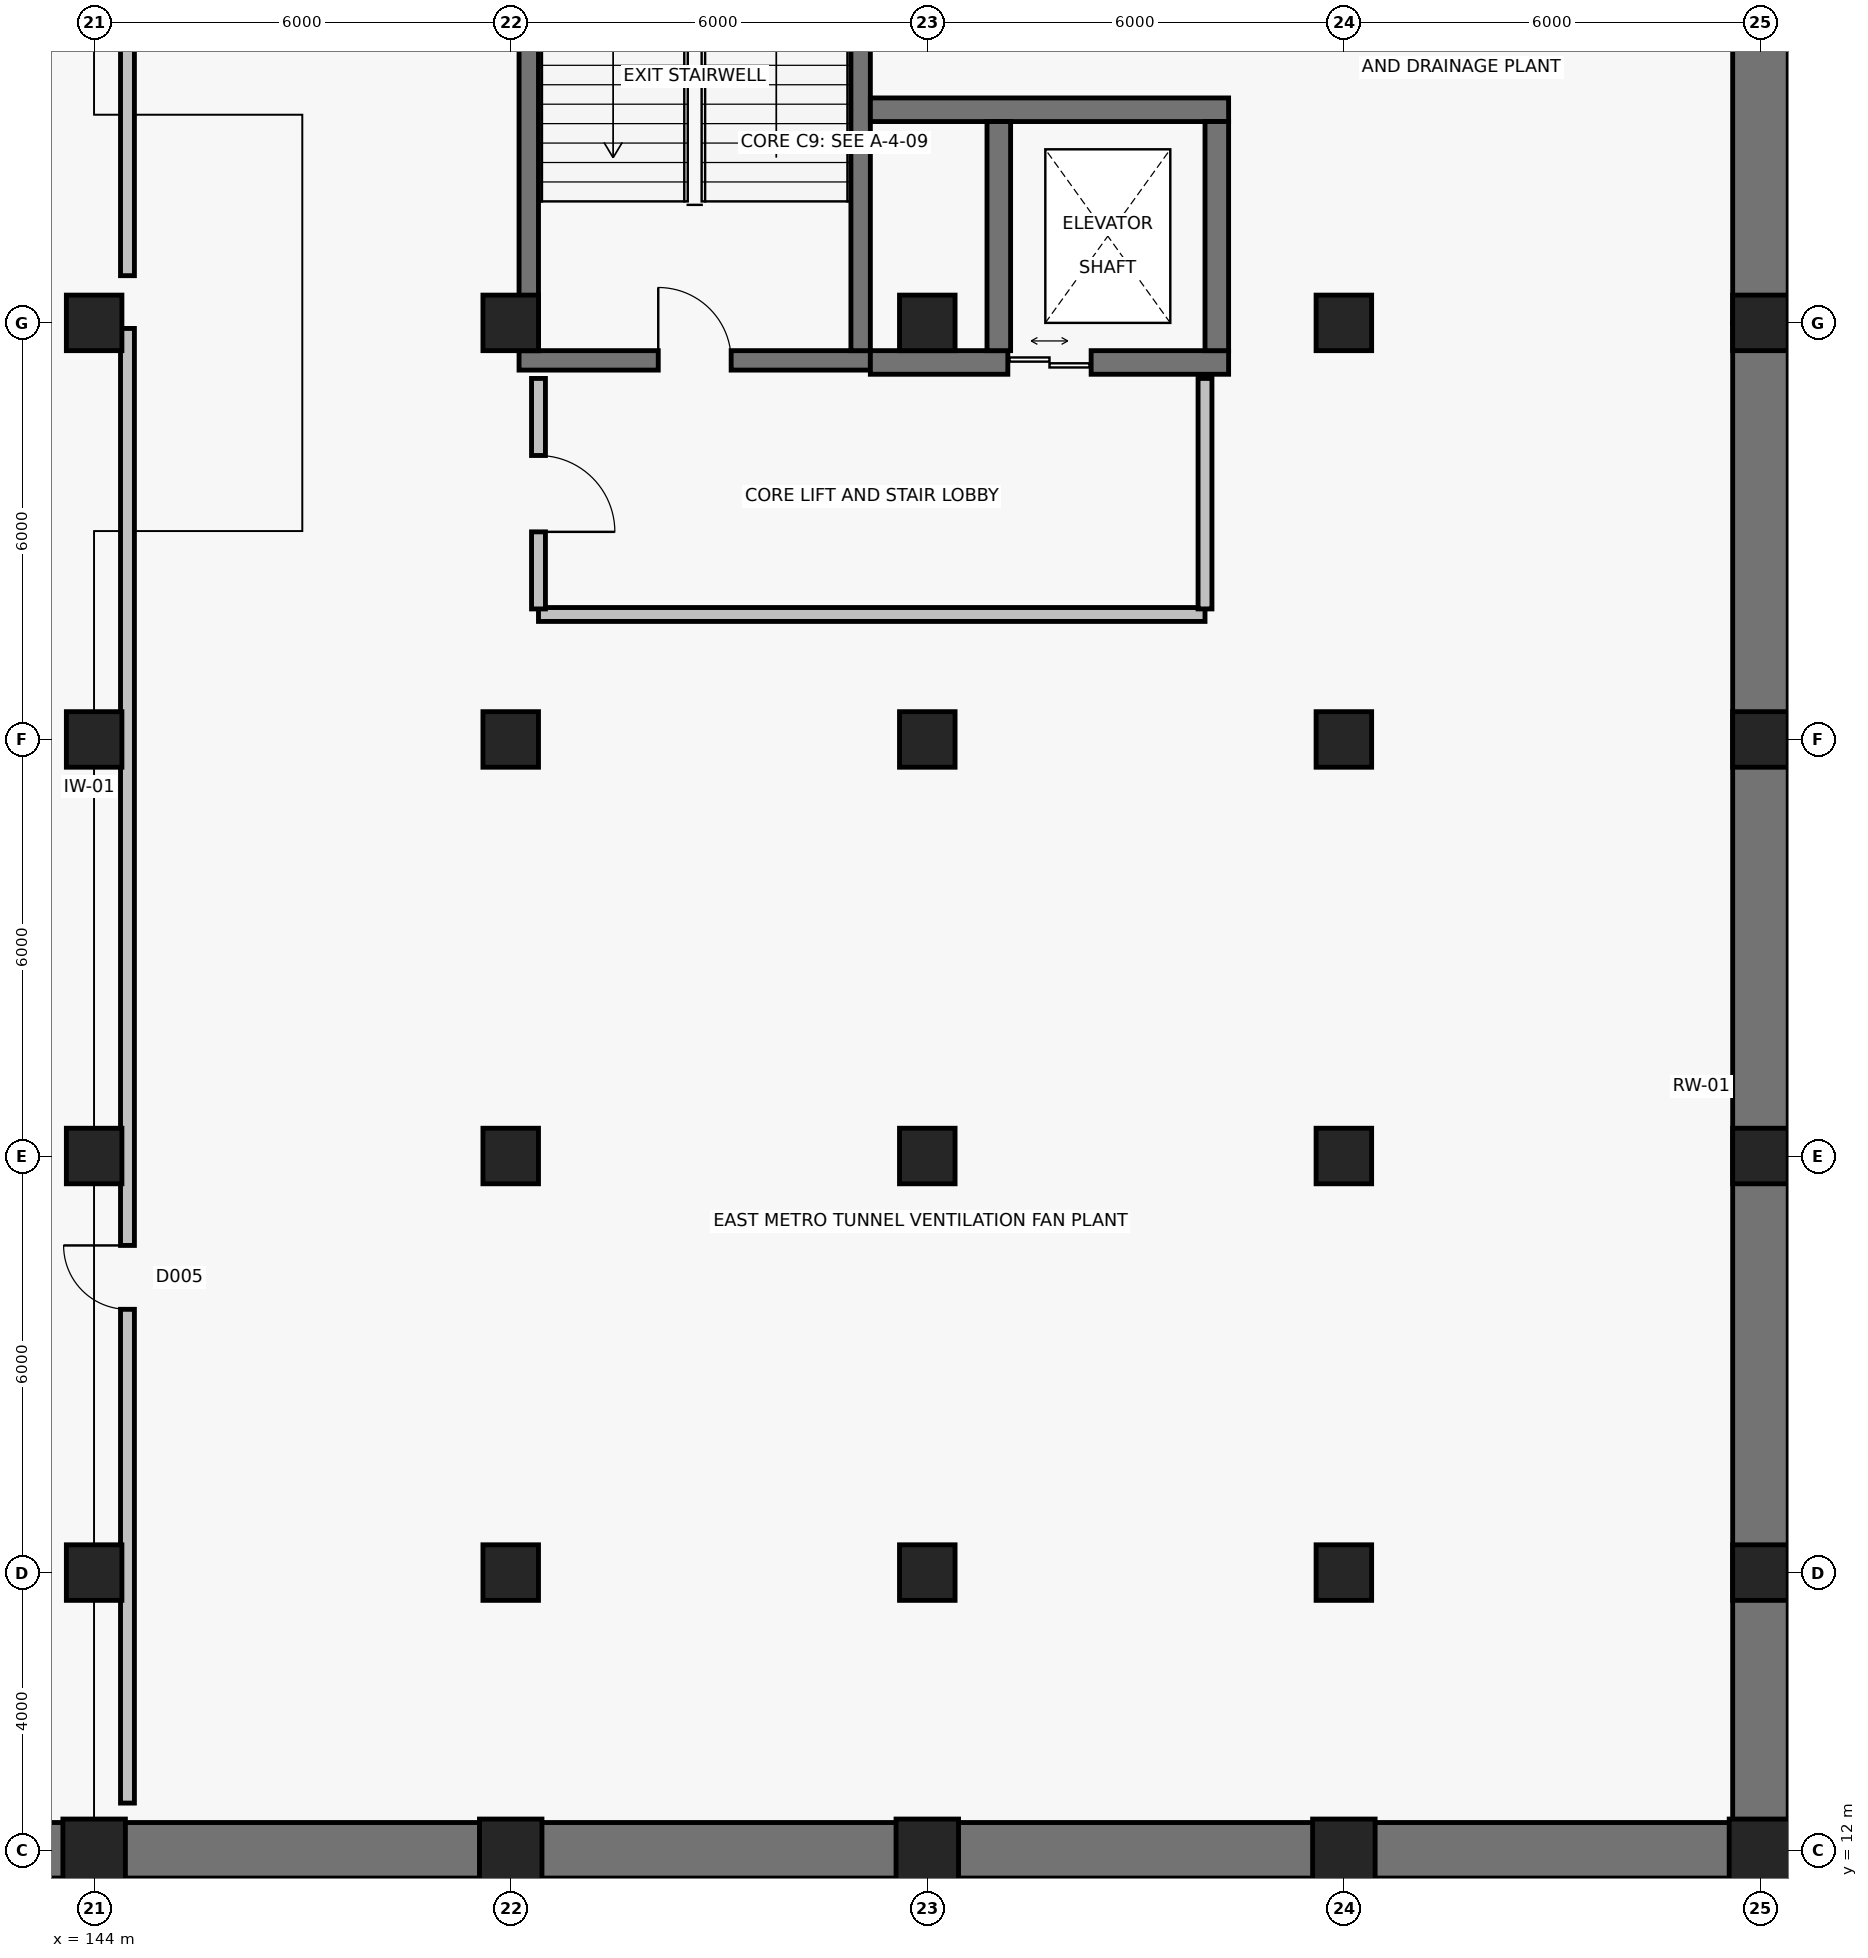
"""IFC4 building model, lengths in metres.
Left out: names, types, materials, properties, quantities, classifications, styles, units other than length and angle.
Written with IfcOpenShell. Run it as: python <this file> out.ifc"""

import sys

from ifc_helpers import new_model, si_unit, direction, frame, frame_2d, origin, origin_2d, place, context, subcontext, project, spatial, rectangle, extrude, element, fill, save


model = new_model("IFC4")
c1 = context("Model", 3, precision=1e-05, world=origin(), true_north=direction((0.0, 1.0)))
c2 = subcontext(c1, "Body", "Model", "MODEL_VIEW")
j1 = project(units=[si_unit("LENGTHUNIT", "METRE"), si_unit("PLANEANGLEUNIT", "RADIAN")], contexts=[c1])
p1 = place(None, origin())
s1 = spatial("IfcSite", under=j1, at=p1, CompositionType="ELEMENT")
p2 = place(p1, origin())
s2 = spatial("IfcBuilding", under=s1, at=p2, CompositionType="ELEMENT")
p3 = place(p2, frame((0.0, 0.0, -10.4)))
s3 = spatial("IfcBuildingStorey", under=s2, at=p3, CompositionType="ELEMENT", Elevation=-10.4)
p4 = place(p3, frame((144.0, 12.0, 0.0), z_axis=(0.0, 0.0, 1.0), x_axis=(1.0, 0.0, 0.0)))
e1 = element("IfcColumn", 1, at=p4, inside=s3, PredefinedType="COLUMN", context=c2, shape_type="SweptSolid", body=[
    extrude(rectangle(XDim=0.9, YDim=0.9, at=origin_2d()), origin(), (0.0, 0.0, 1.0), 5.6),
])
for number, where, z_axis, x_axis in (
    (2, (144.0, 16.0, 0.0), (0.0, 0.0, 1.0), (1.0, 0.0, 0.0)),
    (3, (144.0, 22.0, 0.0), (0.0, 0.0, 1.0), (1.0, 0.0, 0.0)),
    (4, (144.0, 28.0, 0.0), (0.0, 0.0, 1.0), (1.0, 0.0, 0.0)),
    (5, (144.0, 34.0, 0.0), (0.0, 0.0, 1.0), (1.0, 0.0, 0.0)),
):
    element("IfcColumn", number, at=place(p3, frame(where, z_axis=z_axis, x_axis=x_axis)), inside=s3, PredefinedType="COLUMN", context=c2, shape_type="SweptSolid", body=[
        extrude(rectangle(XDim=0.8, YDim=0.8, at=origin_2d()), origin(), (0.0, 0.0, 1.0), 5.6),
    ])
p5 = place(p3, frame((150.0, 12.0, 0.0), z_axis=(0.0, 0.0, 1.0), x_axis=(1.0, 0.0, 0.0)))
e6 = element("IfcColumn", 6, at=p5, inside=s3, PredefinedType="COLUMN", context=c2, shape_type="SweptSolid", body=[
    extrude(rectangle(XDim=0.9, YDim=0.9, at=origin_2d()), origin(), (0.0, 0.0, 1.0), 5.6),
])
for number, where, z_axis, x_axis in (
    (7, (150.0, 16.0, 0.0), (0.0, 0.0, 1.0), (1.0, 0.0, 0.0)),
    (8, (150.0, 22.0, 0.0), (0.0, 0.0, 1.0), (1.0, 0.0, 0.0)),
    (9, (150.0, 28.0, 0.0), (0.0, 0.0, 1.0), (1.0, 0.0, 0.0)),
    (10, (150.0, 34.0, 0.0), (0.0, 0.0, 1.0), (1.0, 0.0, 0.0)),
):
    element("IfcColumn", number, at=place(p3, frame(where, z_axis=z_axis, x_axis=x_axis)), inside=s3, PredefinedType="COLUMN", context=c2, shape_type="SweptSolid", body=[
        extrude(rectangle(XDim=0.8, YDim=0.8, at=origin_2d()), origin(), (0.0, 0.0, 1.0), 5.6),
    ])
p6 = place(p3, frame((156.0, 12.0, 0.0), z_axis=(0.0, 0.0, 1.0), x_axis=(1.0, 0.0, 0.0)))
e11 = element("IfcColumn", 11, at=p6, inside=s3, PredefinedType="COLUMN", context=c2, shape_type="SweptSolid", body=[
    extrude(rectangle(XDim=0.9, YDim=0.9, at=origin_2d()), origin(), (0.0, 0.0, 1.0), 5.6),
])
for number, where, z_axis, x_axis in (
    (12, (156.0, 16.0, 0.0), (0.0, 0.0, 1.0), (1.0, 0.0, 0.0)),
    (13, (156.0, 22.0, 0.0), (0.0, 0.0, 1.0), (1.0, 0.0, 0.0)),
    (14, (156.0, 28.0, 0.0), (0.0, 0.0, 1.0), (1.0, 0.0, 0.0)),
    (15, (156.0, 34.0, 0.0), (0.0, 0.0, 1.0), (1.0, 0.0, 0.0)),
):
    element("IfcColumn", number, at=place(p3, frame(where, z_axis=z_axis, x_axis=x_axis)), inside=s3, PredefinedType="COLUMN", context=c2, shape_type="SweptSolid", body=[
        extrude(rectangle(XDim=0.8, YDim=0.8, at=origin_2d()), origin(), (0.0, 0.0, 1.0), 5.6),
    ])
p7 = place(p3, frame((162.0, 12.0, 0.0), z_axis=(0.0, 0.0, 1.0), x_axis=(1.0, 0.0, 0.0)))
e16 = element("IfcColumn", 16, at=p7, inside=s3, PredefinedType="COLUMN", context=c2, shape_type="SweptSolid", body=[
    extrude(rectangle(XDim=0.9, YDim=0.9, at=origin_2d()), origin(), (0.0, 0.0, 1.0), 5.6),
])
for number, where, z_axis, x_axis in (
    (17, (162.0, 16.0, 0.0), (0.0, 0.0, 1.0), (1.0, 0.0, 0.0)),
    (18, (162.0, 22.0, 0.0), (0.0, 0.0, 1.0), (1.0, 0.0, 0.0)),
    (19, (162.0, 28.0, 0.0), (0.0, 0.0, 1.0), (1.0, 0.0, 0.0)),
    (20, (162.0, 34.0, 0.0), (0.0, 0.0, 1.0), (1.0, 0.0, 0.0)),
):
    element("IfcColumn", number, at=place(p3, frame(where, z_axis=z_axis, x_axis=x_axis)), inside=s3, PredefinedType="COLUMN", context=c2, shape_type="SweptSolid", body=[
        extrude(rectangle(XDim=0.8, YDim=0.8, at=origin_2d()), origin(), (0.0, 0.0, 1.0), 5.6),
    ])
p8 = place(p3, frame((168.0, 12.0, 0.0), z_axis=(0.0, 0.0, 1.0), x_axis=(1.0, 0.0, 0.0)))
e21 = element("IfcColumn", 21, at=p8, inside=s3, PredefinedType="COLUMN", context=c2, shape_type="SweptSolid", body=[
    extrude(rectangle(XDim=0.9, YDim=0.9, at=origin_2d()), origin(), (0.0, 0.0, 1.0), 5.6),
])
for number, where, z_axis, x_axis in (
    (22, (168.0, 16.0, 0.0), (0.0, 0.0, 1.0), (1.0, 0.0, 0.0)),
    (23, (168.0, 22.0, 0.0), (0.0, 0.0, 1.0), (1.0, 0.0, 0.0)),
    (24, (168.0, 28.0, 0.0), (0.0, 0.0, 1.0), (1.0, 0.0, 0.0)),
    (25, (168.0, 34.0, 0.0), (0.0, 0.0, 1.0), (1.0, 0.0, 0.0)),
):
    element("IfcColumn", number, at=place(p3, frame(where, z_axis=z_axis, x_axis=x_axis)), inside=s3, PredefinedType="COLUMN", context=c2, shape_type="SweptSolid", body=[
        extrude(rectangle(XDim=0.8, YDim=0.8, at=origin_2d()), origin(), (0.0, 0.0, 1.0), 5.6),
    ])
p9 = place(p3, frame((138.0, 12.0, 0.0), z_axis=(0.0, 0.0, 1.0), x_axis=(1.0, 0.0, 0.0)))
e26 = element("IfcWall", 26, at=p9, inside=s3, PredefinedType="USERDEFINED", context=c2, shape_type="SweptSolid", body=[
    extrude(rectangle(XDim=30.0, YDim=0.8, at=frame_2d((15.0, 0.0))), origin(), (0.0, 0.0, 1.0), 5.15),
])
for number, where, z_axis, x_axis in (
    (27, (168.0, 12.0, 0.0), (0.0, 0.0, 1.0), (0.0, 1.0, 0.0)),
    (28, (168.0, 34.0, 0.0), (0.0, 0.0, 1.0), (0.0, 1.0, 0.0)),
):
    element("IfcWall", number, at=place(p3, frame(where, z_axis=z_axis, x_axis=x_axis)), inside=s3, PredefinedType="USERDEFINED", context=c2, shape_type="SweptSolid", body=[
        extrude(rectangle(XDim=22.0, YDim=0.8, at=frame_2d((11.0, 0.0))), origin(), (0.0, 0.0, 1.0), 5.15),
    ])
p10 = place(p3, frame((150.12, 33.46, 0.0), z_axis=(0.0, 0.0, 1.0), x_axis=(1.0, 0.0, 0.0)))
e29 = element("IfcWall", 29, at=p10, inside=s3, PredefinedType="SHEAR", context=c2, shape_type="SweptSolid", body=[
    extrude(rectangle(XDim=5.06, YDim=0.28, at=frame_2d((2.53, 0.0))), origin(), (0.0, 0.0, 1.0), 5.15),
])
p11 = place(p10, frame((2.005, 0.0, 0.0)))
e30 = element("IfcOpeningElement", 30, at=p11, cuts=e29, PredefinedType="OPENING", context=c2, shape_type="SweptSolid", body=[
    extrude(rectangle(XDim=1.05, YDim=2.15, at=frame_2d((0.525, 1.075))), frame((0.0, 0.155, 0.0), z_axis=(0.0, -1.0, 0.0), x_axis=(1.0, 0.0, 0.0)), (0.0, 0.0, 1.0), 0.31),
])
for number, where, z_axis, x_axis in (
    (31, (150.26, 43.4, 0.0), (0.0, 0.0, 1.0), (0.0, -1.0, 0.0)),
    (32, (155.04, 33.6, 0.0), (0.0, 0.0, 1.0), (0.0, 1.0, 0.0)),
):
    element("IfcWall", number, at=place(p3, frame(where, z_axis=z_axis, x_axis=x_axis)), inside=s3, PredefinedType="SHEAR", context=c2, shape_type="SweptSolid", body=[
        extrude(rectangle(XDim=9.8, YDim=0.28, at=frame_2d((4.9, 0.0))), origin(), (0.0, 0.0, 1.0), 5.15),
    ])
p12 = place(p3, frame((155.18, 33.43, 0.0), z_axis=(0.0, 0.0, 1.0), x_axis=(1.0, 0.0, 0.0)))
e33 = element("IfcWall", 33, at=p12, inside=s3, PredefinedType="SHEAR", context=c2, shape_type="SweptSolid", body=[
    extrude(rectangle(XDim=5.16, YDim=0.34, at=frame_2d((2.58, 0.0))), origin(), (0.0, 0.0, 1.0), 5.15),
])
p13 = place(p12, frame((1.98, 0.0, 0.0)))
e34 = element("IfcOpeningElement", 34, at=p13, cuts=e33, PredefinedType="OPENING", context=c2, shape_type="SweptSolid", body=[
    extrude(rectangle(XDim=1.2, YDim=2.2, at=frame_2d((0.6, 1.1))), frame((0.0, 0.185, 0.0), z_axis=(0.0, -1.0, 0.0), x_axis=(1.0, 0.0, 0.0)), (0.0, 0.0, 1.0), 0.37),
])
p14 = place(p3, frame((160.34, 37.07, 0.0), z_axis=(0.0, 0.0, 1.0), x_axis=(-1.0, 0.0, 0.0)))
e35 = element("IfcWall", 35, at=p14, inside=s3, PredefinedType="SHEAR", context=c2, shape_type="SweptSolid", body=[
    extrude(rectangle(XDim=5.16, YDim=0.34, at=frame_2d((2.58, 0.0))), origin(), (0.0, 0.0, 1.0), 5.15),
])
for number, where, z_axis, x_axis in (
    (36, (157.03, 36.9, 0.0), (0.0, 0.0, 1.0), (0.0, -1.0, 0.0)),
    (37, (160.17, 33.6, 0.0), (0.0, 0.0, 1.0), (0.0, 1.0, 0.0)),
):
    element("IfcWall", number, at=place(p3, frame(where, z_axis=z_axis, x_axis=x_axis)), inside=s3, PredefinedType="SHEAR", context=c2, shape_type="SweptSolid", body=[
        extrude(rectangle(XDim=3.3, YDim=0.34, at=frame_2d((1.65, 0.0))), origin(), (0.0, 0.0, 1.0), 5.15),
    ])
p15 = place(p3, frame((150.4, 29.8, 0.0), z_axis=(0.0, 0.0, 1.0), x_axis=(1.0, 0.0, 0.0)))
e38 = element("IfcWall", 38, at=p15, inside=s3, PredefinedType="PARTITIONING", context=c2, shape_type="SweptSolid", body=[
    extrude(rectangle(XDim=9.6, YDim=0.2, at=frame_2d((4.8, 0.0))), origin(), (0.0, 0.0, 1.0), 4.68),
])
p16 = place(p3, frame((150.4, 33.2, 0.0), z_axis=(0.0, 0.0, 1.0), x_axis=(0.0, -1.0, 0.0)))
e39 = element("IfcWall", 39, at=p16, inside=s3, PredefinedType="PARTITIONING", context=c2, shape_type="SweptSolid", body=[
    extrude(rectangle(XDim=3.32, YDim=0.2, at=frame_2d((1.66, 0.0))), origin(), (0.0, 0.0, 1.0), 4.68),
])
p17 = place(p16, frame((1.11, 0.0, 0.0)))
e40 = element("IfcOpeningElement", 40, at=p17, cuts=e39, PredefinedType="OPENING", context=c2, shape_type="SweptSolid", body=[
    extrude(rectangle(XDim=1.1, YDim=2.15, at=frame_2d((0.55, 1.075))), frame((0.0, 0.115, 0.0), z_axis=(0.0, -1.0, 0.0), x_axis=(1.0, 0.0, 0.0)), (0.0, 0.0, 1.0), 0.23),
])
p18 = place(p3, frame((160.0, 29.88, 0.0), z_axis=(0.0, 0.0, 1.0), x_axis=(0.0, 1.0, 0.0)))
e41 = element("IfcWall", 41, at=p18, inside=s3, PredefinedType="PARTITIONING", context=c2, shape_type="SweptSolid", body=[
    extrude(rectangle(XDim=3.32, YDim=0.2, at=frame_2d((1.66, 0.0))), origin(), (0.0, 0.0, 1.0), 5.15),
])
p19 = place(p3, frame((144.48, 12.68, 0.0), z_axis=(0.0, 0.0, 1.0), x_axis=(0.0, 1.0, 0.0)))
e42 = element("IfcWall", 42, at=p19, inside=s3, PredefinedType="PARTITIONING", context=c2, shape_type="SweptSolid", body=[
    extrude(rectangle(XDim=21.24, YDim=0.2, at=frame_2d((10.62, 0.0))), origin(), (0.0, 0.0, 1.0), 4.68),
])
p20 = place(p19, frame((7.112, 0.0, 0.0)))
e43 = element("IfcOpeningElement", 43, at=p20, cuts=e42, PredefinedType="OPENING", context=c2, shape_type="SweptSolid", body=[
    extrude(rectangle(XDim=0.92, YDim=2.1, at=frame_2d((0.46, 1.05))), frame((0.0, 0.115, 0.0), z_axis=(0.0, -1.0, 0.0), x_axis=(1.0, 0.0, 0.0)), (0.0, 0.0, 1.0), 0.23),
])
p21 = place(p3, frame((144.48, 34.68, 0.0), z_axis=(0.0, 0.0, 1.0), x_axis=(0.0, 1.0, 0.0)))
e44 = element("IfcWall", 44, at=p21, inside=s3, PredefinedType="PARTITIONING", context=c2, shape_type="SweptSolid", body=[
    extrude(rectangle(XDim=20.64, YDim=0.2, at=frame_2d((10.32, 0.0))), origin(), (0.0, 0.0, 1.0), 4.68),
])
p22 = place(p21, frame((6.874, 0.0, 0.0)))
e45 = element("IfcOpeningElement", 45, at=p22, cuts=e44, PredefinedType="OPENING", context=c2, shape_type="SweptSolid", body=[
    extrude(rectangle(XDim=1.0, YDim=2.15, at=frame_2d((0.5, 1.075))), frame((0.0, 0.115, 0.0), z_axis=(0.0, -1.0, 0.0), x_axis=(1.0, 0.0, 0.0)), (0.0, 0.0, 1.0), 0.23),
])
p23 = place(p11, origin())
e46 = element("IfcDoor", 46, at=p23, inside=s3, OperationType="SINGLE_SWING_LEFT", PredefinedType="DOOR", context=c2, shape_type="SweptSolid", body=[
    extrude(rectangle(XDim=1.05, YDim=2.15, at=frame_2d((0.525, 1.075))), frame((0.0, 0.025, 0.0), z_axis=(0.0, -1.0, 0.0), x_axis=(1.0, 0.0, 0.0)), (0.0, 0.0, 1.0), 0.05),
])
fill(e30, e46)
p24 = place(p13, origin())
e47 = element("IfcDoor", 47, at=p24, inside=s3, OperationType="DOUBLE_DOOR_SLIDING", PredefinedType="DOOR", context=c2, shape_type="SweptSolid", body=[
    extrude(rectangle(XDim=1.2, YDim=2.2, at=frame_2d((0.6, 1.1))), frame((0.0, 0.025, 0.0), z_axis=(0.0, -1.0, 0.0), x_axis=(1.0, 0.0, 0.0)), (0.0, 0.0, 1.0), 0.05),
])
fill(e34, e47)
p25 = place(p17, origin())
e48 = element("IfcDoor", 48, at=p25, inside=s3, OperationType="SINGLE_SWING_RIGHT", PredefinedType="DOOR", context=c2, shape_type="SweptSolid", body=[
    extrude(rectangle(XDim=1.1, YDim=2.15, at=frame_2d((0.55, 1.075))), frame((0.0, 0.025, 0.0), z_axis=(0.0, -1.0, 0.0), x_axis=(1.0, 0.0, 0.0)), (0.0, 0.0, 1.0), 0.05),
])
fill(e40, e48)
p26 = place(p20, origin())
e49 = element("IfcDoor", 49, at=p26, inside=s3, OperationType="SINGLE_SWING_RIGHT", PredefinedType="DOOR", context=c2, shape_type="SweptSolid", body=[
    extrude(rectangle(XDim=0.92, YDim=2.1, at=frame_2d((0.46, 1.05))), frame((0.0, 0.025, 0.0), z_axis=(0.0, -1.0, 0.0), x_axis=(1.0, 0.0, 0.0)), (0.0, 0.0, 1.0), 0.05),
])
fill(e43, e49)
save(model, sys.argv[1])
